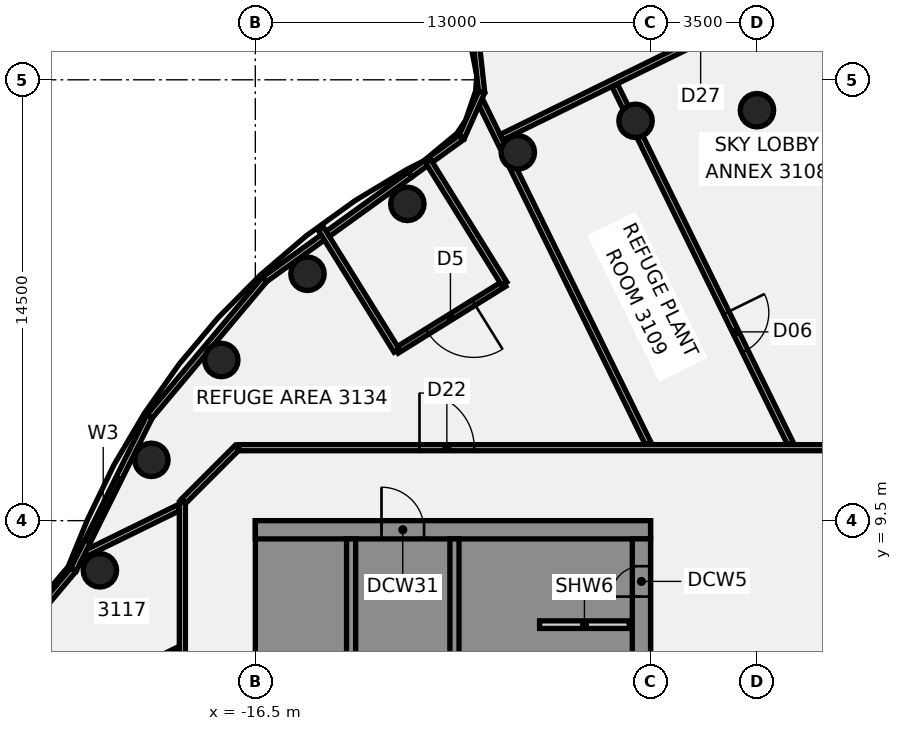
"""IFC4 building model, lengths in metres.
Left out: names, types, materials, properties, quantities, classifications, styles, units other than length and angle.
Written with IfcOpenShell. Run it as: python <this file> out.ifc"""

import sys

from ifc_helpers import new_model, si_unit, direction, frame, frame_2d, origin, origin_2d, place, context, subcontext, project, spatial, polyline, rectangle, circle, outline, extrude, element, fill, save


model = new_model("IFC4")
c1 = context("Model", 3, precision=1e-05, world=origin(), true_north=direction((0.0, 1.0)))
c2 = subcontext(c1, "Body", "Model", "MODEL_VIEW")
j1 = project(units=[si_unit("LENGTHUNIT", "METRE"), si_unit("PLANEANGLEUNIT", "RADIAN")], contexts=[c1])
p1 = place(None, origin())
s1 = spatial("IfcSite", under=j1, at=p1, CompositionType="ELEMENT")
p2 = place(p1, origin())
s2 = spatial("IfcBuilding", under=s1, at=p2, CompositionType="ELEMENT")
p3 = place(p2, frame((0.0, 0.0, 128.5)))
s3 = spatial("IfcBuildingStorey", under=s2, at=p3, CompositionType="ELEMENT", Elevation=128.5)
for number, where, z_axis, x_axis in (
    (1, (0.0, 23.0, -0.18), (0.0, 0.0, 1.0), (1.0, 0.0, 0.0)),
    (2, (-3.994, 22.651, -0.18), (0.0, 0.0, 1.0), (1.0, 0.0, 0.0)),
    (3, (-7.866, 21.613, -0.18), (0.0, 0.0, 1.0), (1.0, 0.0, 0.0)),
    (4, (-11.5, 19.919, -0.18), (0.0, 0.0, 1.0), (1.0, 0.0, 0.0)),
    (5, (-14.784, 17.619, -0.18), (0.0, 0.0, 1.0), (1.0, 0.0, 0.0)),
    (6, (-17.619, 14.784, -0.18), (0.0, 0.0, 1.0), (1.0, 0.0, 0.0)),
    (7, (-19.919, 11.5, -0.18), (0.0, 0.0, 1.0), (1.0, 0.0, 0.0)),
    (8, (-21.613, 7.866, -0.18), (0.0, 0.0, 1.0), (1.0, 0.0, 0.0)),
):
    element("IfcColumn", number, at=place(p3, frame(where, z_axis=z_axis, x_axis=x_axis)), inside=s3, PredefinedType="COLUMN", context=c2, shape_type="SweptSolid", body=[
        extrude(circle(Radius=0.55, at=origin_2d()), origin(), (0.0, 0.0, 1.0), 4.54),
    ])
p4 = place(p3, frame((-9.071, 23.236, 0.0), z_axis=(0.0, 0.0, 1.0), x_axis=(0.440237576132, -0.897881326547, 0.0)))
e9 = element("IfcWall", 9, at=p4, inside=s3, PredefinedType="PARTITIONING", context=c2, shape_type="SweptSolid", body=[
    extrude(rectangle(XDim=1.585, YDim=0.2, at=frame_2d((0.792, 0.0))), origin(), (0.0, 0.0, 1.0), 3.66),
])
p5 = place(p3, frame((-8.02, 21.094, 0.0), z_axis=(0.0, 0.0, 1.0), x_axis=(0.440277206209, -0.897861894555, 0.0)))
e10 = element("IfcWall", 10, at=p5, inside=s3, PredefinedType="PARTITIONING", context=c2, shape_type="SweptSolid", body=[
    extrude(rectangle(XDim=10.1, YDim=0.2, at=frame_2d((5.05, 0.0))), origin(), (0.0, 0.0, 1.0), 3.66),
])
p6 = place(p3, frame((-4.682, 23.825, 0.0), z_axis=(0.0, 0.0, 1.0), x_axis=(0.440176037117, -0.897911496946, 0.0)))
e11 = element("IfcWall", 11, at=p6, inside=s3, PredefinedType="PARTITIONING", context=c2, shape_type="SweptSolid", body=[
    extrude(rectangle(XDim=0.82, YDim=0.2, at=frame_2d((0.41, 0.0))), origin(), (0.0, 0.0, 1.0), 3.66),
])
p7 = place(p3, frame((-3.85, 22.129, 0.0), z_axis=(0.0, 0.0, 1.0), x_axis=(0.440292349425, -0.897854468741, 0.0)))
e12 = element("IfcWall", 12, at=p7, inside=s3, PredefinedType="PARTITIONING", context=c2, shape_type="SweptSolid", body=[
    extrude(rectangle(XDim=11.253, YDim=0.2, at=frame_2d((5.626, 0.0))), origin(), (0.0, 0.0, 1.0), 3.66),
])
p8 = place(p7, frame((6.45, 0.0, 0.0)))
e13 = element("IfcOpeningElement", 13, at=p8, cuts=e12, PredefinedType="OPENING", context=c2, shape_type="SweptSolid", body=[
    extrude(rectangle(XDim=1.4, YDim=2.1, at=frame_2d((0.7, 1.05))), frame((0.0, 0.11, 0.0), z_axis=(0.0, -1.0, 0.0), x_axis=(1.0, 0.0, 0.0)), (0.0, 0.0, 1.0), 0.22),
])
p9 = place(p3, frame((1.424, 26.819, 0.0), z_axis=(0.0, 0.0, 1.0), x_axis=(0.44020427787, -0.897897652155, 0.0)))
e14 = element("IfcWall", 14, at=p9, inside=s3, PredefinedType="PARTITIONING", context=c2, shape_type="SweptSolid", body=[
    extrude(rectangle(XDim=4.593, YDim=0.2, at=frame_2d((2.296, 0.0))), origin(), (0.0, 0.0, 1.0), 3.66),
])
p10 = place(p3, frame((-17.045, 11.9, 0.0), z_axis=(0.0, 0.0, 1.0), x_axis=(1.0, 0.0, 0.0)))
e15 = element("IfcWall", 15, at=p10, inside=s3, PredefinedType="PARTITIONING", context=c2, shape_type="SweptSolid", body=[
    extrude(rectangle(XDim=34.145, YDim=0.2, at=frame_2d((17.073, 0.0))), origin(), (0.0, 0.0, 1.0), 3.66),
])
p11 = place(p10, frame((21.061, 0.0, 0.0)))
e16 = element("IfcOpeningElement", 16, at=p11, cuts=e15, PredefinedType="OPENING", context=c2, shape_type="SweptSolid", body=[
    extrude(rectangle(XDim=1.8, YDim=2.1, at=frame_2d((0.9, 1.05))), frame((0.0, 0.11, 0.0), z_axis=(0.0, -1.0, 0.0), x_axis=(1.0, 0.0, 0.0)), (0.0, 0.0, 1.0), 0.22),
])
p12 = place(p10, frame((30.796, 0.0, 0.0)))
e17 = element("IfcOpeningElement", 17, at=p12, cuts=e15, PredefinedType="OPENING", context=c2, shape_type="SweptSolid", body=[
    extrude(rectangle(XDim=1.8, YDim=2.1, at=frame_2d((0.9, 1.05))), frame((0.0, 0.11, 0.0), z_axis=(0.0, -1.0, 0.0), x_axis=(1.0, 0.0, 0.0)), (0.0, 0.0, 1.0), 0.22),
])
p13 = place(p10, frame((5.945, 0.0, 0.0)))
e18 = element("IfcOpeningElement", 18, at=p13, cuts=e15, PredefinedType="OPENING", context=c2, shape_type="SweptSolid", body=[
    extrude(rectangle(XDim=1.8, YDim=2.1, at=frame_2d((0.9, 1.05))), frame((0.0, 0.11, 0.0), z_axis=(0.0, -1.0, 0.0), x_axis=(1.0, 0.0, 0.0)), (0.0, 0.0, 1.0), 0.22),
])
p14 = place(p3, frame((-22.181, 3.698, 0.0), z_axis=(0.0, 0.0, 1.0), x_axis=(0.897873346888, 0.440253850578, 0.0)))
e19 = element("IfcWall", 19, at=p14, inside=s3, PredefinedType="PARTITIONING", context=c2, shape_type="SweptSolid", body=[
    extrude(rectangle(XDim=3.515, YDim=0.2, at=frame_2d((1.757, 0.0))), origin(), (0.0, 0.0, 1.0), 3.66),
])
p15 = place(p3, frame((-22.17, 8.382, 0.0), z_axis=(0.0, 0.0, 1.0), x_axis=(0.897982311867, 0.44003155293, 0.0)))
e20 = element("IfcWall", 20, at=p15, inside=s3, PredefinedType="PARTITIONING", context=c2, shape_type="SweptSolid", body=[
    extrude(rectangle(XDim=3.501, YDim=0.2, at=frame_2d((1.751, 0.0))), origin(), (0.0, 0.0, 1.0), 3.66),
])
p16 = place(p3, frame((-8.407, 22.11, 0.0), z_axis=(0.0, 0.0, 1.0), x_axis=(0.897880211861, 0.440239849569, 0.0)))
e21 = element("IfcWall", 21, at=p16, inside=s3, PredefinedType="PARTITIONING", context=c2, shape_type="SweptSolid", body=[
    extrude(rectangle(XDim=14.199, YDim=0.2, at=frame_2d((7.1, 0.0))), origin(), (0.0, 0.0, 1.0), 3.66),
])
p17 = place(p16, frame((6.601, 0.0, 0.0)))
e22 = element("IfcOpeningElement", 22, at=p17, cuts=e21, PredefinedType="OPENING", context=c2, shape_type="SweptSolid", body=[
    extrude(rectangle(XDim=1.4, YDim=2.1, at=frame_2d((0.7, 1.05))), frame((0.0, 0.11, 0.0), z_axis=(0.0, -1.0, 0.0), x_axis=(1.0, 0.0, 0.0)), (0.0, 0.0, 1.0), 0.22),
])
p18 = place(p3, frame((-18.858, 10.142, 0.0), z_axis=(0.0, 0.0, 1.0), x_axis=(0.707106781187, 0.707106781187, 0.0)))
e23 = element("IfcWall", 23, at=p18, inside=s3, PredefinedType="PARTITIONING", context=c2, shape_type="SweptSolid", body=[
    extrude(rectangle(XDim=2.486, YDim=0.2, at=frame_2d((1.243, 0.0))), origin(), (0.0, 0.0, 1.0), 3.66),
])
p19 = place(p3, frame((-18.9, -10.1, 0.0), z_axis=(0.0, 0.0, 1.0), x_axis=(0.0, 1.0, 0.0)))
e24 = element("IfcWall", 24, at=p19, inside=s3, PredefinedType="PARTITIONING", context=c2, shape_type="SweptSolid", body=[
    extrude(rectangle(XDim=20.2, YDim=0.2, at=frame_2d((10.1, 0.0))), origin(), (0.0, 0.0, 1.0), 3.66),
])
p20 = place(p19, frame((11.583, 0.0, 0.0)))
e25 = element("IfcOpeningElement", 25, at=p20, cuts=e24, PredefinedType="OPENING", context=c2, shape_type="SweptSolid", body=[
    extrude(rectangle(XDim=1.8, YDim=2.1, at=frame_2d((0.9, 1.05))), frame((0.0, 0.11, 0.0), z_axis=(0.0, -1.0, 0.0), x_axis=(1.0, 0.0, 0.0)), (0.0, 0.0, 1.0), 0.22),
])
p21 = place(p19, frame((4.356, 0.0, 0.0)))
e26 = element("IfcOpeningElement", 26, at=p21, cuts=e24, PredefinedType="OPENING", context=c2, shape_type="SweptSolid", body=[
    extrude(rectangle(XDim=1.4, YDim=2.1, at=frame_2d((0.7, 1.05))), frame((0.0, 0.11, 0.0), z_axis=(0.0, -1.0, 0.0), x_axis=(1.0, 0.0, 0.0)), (0.0, 0.0, 1.0), 0.22),
])
p22 = place(p3, frame((-9.244, 25.313, 0.0), z_axis=(0.0, 0.0, 1.0), x_axis=(0.109471500068, -0.993989934895, 0.0)))
e27 = element("IfcWall", 27, at=p22, inside=s3, PredefinedType="SOLIDWALL", context=c2, shape_type="SweptSolid", body=[
    extrude(rectangle(XDim=1.731, YDim=0.2, at=frame_2d((0.865, 0.0))), origin(), (0.0, 0.0, 1.0), 4.36),
])
p23 = place(p3, frame((-9.055, 23.593, 0.0), z_axis=(0.0, 0.0, 1.0), x_axis=(-0.407568379485, -0.913174690869, 0.0)))
e28 = element("IfcWall", 28, at=p23, inside=s3, PredefinedType="SOLIDWALL", context=c2, shape_type="SweptSolid", body=[
    extrude(rectangle(XDim=1.631, YDim=0.2, at=frame_2d((0.815, 0.0))), origin(), (0.0, 0.0, 1.0), 4.36),
])
p24 = place(p3, frame((-9.72, 22.103, 0.0), z_axis=(0.0, 0.0, 1.0), x_axis=(-0.810756201685, -0.585383960687, 0.0)))
e29 = element("IfcWall", 29, at=p24, inside=s3, PredefinedType="SOLIDWALL", context=c2, shape_type="SweptSolid", body=[
    extrude(rectangle(XDim=2.091, YDim=0.2, at=frame_2d((1.045, 0.0))), origin(), (0.0, 0.0, 1.0), 4.36),
])
p25 = place(p3, frame((-11.415, 20.879, 0.0), z_axis=(0.0, 0.0, 1.0), x_axis=(-0.811328226988, -0.584590889506, 0.0)))
e30 = element("IfcWall", 30, at=p25, inside=s3, PredefinedType="SOLIDWALL", context=c2, shape_type="SweptSolid", body=[
    extrude(rectangle(XDim=5.888, YDim=0.2, at=frame_2d((2.944, 0.0))), origin(), (0.0, 0.0, 1.0), 4.36),
])
p26 = place(p3, frame((-16.192, 17.438, 0.0), z_axis=(0.0, 0.0, 1.0), x_axis=(-0.643011155171, -0.765856810589, 0.0)))
e31 = element("IfcWall", 31, at=p26, inside=s3, PredefinedType="SOLIDWALL", context=c2, shape_type="SweptSolid", body=[
    extrude(rectangle(XDim=5.887, YDim=0.2, at=frame_2d((2.943, 0.0))), origin(), (0.0, 0.0, 1.0), 4.36),
])
p27 = place(p3, frame((-19.977, 12.929, 0.0), z_axis=(0.0, 0.0, 1.0), x_axis=(-0.444924691548, -0.895567986727, 0.0)))
e32 = element("IfcWall", 32, at=p27, inside=s3, PredefinedType="SOLIDWALL", context=c2, shape_type="SweptSolid", body=[
    extrude(rectangle(XDim=5.635, YDim=0.2, at=frame_2d((2.818, 0.0))), origin(), (0.0, 0.0, 1.0), 4.36),
])
p28 = place(p27, frame((2.23, 0.0, 1.4)))
e33 = element("IfcOpeningElement", 33, at=p28, cuts=e32, PredefinedType="OPENING", context=c2, shape_type="SweptSolid", body=[
    extrude(rectangle(XDim=2.4, YDim=2.1, at=frame_2d((1.2, 1.05))), frame((0.0, 0.11, 0.0), z_axis=(0.0, -1.0, 0.0), x_axis=(1.0, 0.0, 0.0)), (0.0, 0.0, 1.0), 0.22),
])
p29 = place(p3, frame((-22.484, 7.882, 0.0), z_axis=(0.0, 0.0, 1.0), x_axis=(-0.643982284825, -0.765040402091, 0.0)))
e34 = element("IfcWall", 34, at=p29, inside=s3, PredefinedType="SOLIDWALL", context=c2, shape_type="SweptSolid", body=[
    extrude(rectangle(XDim=1.666, YDim=0.2, at=frame_2d((0.833, 0.0))), origin(), (0.0, 0.0, 1.0), 4.36),
])
p30 = place(p3, frame((-8.311, 17.295, 0.0), z_axis=(0.0, 0.0, 1.0), x_axis=(-0.849445624751, -0.52767616072, 0.0)))
e35 = element("IfcWall", 35, at=p30, inside=s3, PredefinedType="SOLIDWALL", context=c2, shape_type="SweptSolid", body=[
    extrude(rectangle(XDim=4.17, YDim=0.2, at=frame_2d((2.085, 0.0))), origin(), (0.0, 0.0, 1.0), 4.36),
])
p31 = place(p30, frame((1.185, 0.0, 0.0)))
e36 = element("IfcOpeningElement", 36, at=p31, cuts=e35, PredefinedType="OPENING", context=c2, shape_type="SweptSolid", body=[
    extrude(rectangle(XDim=1.8, YDim=2.4, at=frame_2d((0.9, 1.2))), frame((0.0, 0.11, 0.0), z_axis=(0.0, -1.0, 0.0), x_axis=(1.0, 0.0, 0.0)), (0.0, 0.0, 1.0), 0.22),
])
p32 = place(p3, frame((-8.311, 17.295, 0.0), z_axis=(0.0, 0.0, 1.0), x_axis=(-0.527712449553, 0.84942308103, 0.0)))
e37 = element("IfcWall", 37, at=p32, inside=s3, PredefinedType="SOLIDWALL", context=c2, shape_type="SweptSolid", body=[
    extrude(rectangle(XDim=4.745, YDim=0.2, at=frame_2d((2.373, 0.0))), origin(), (0.0, 0.0, 1.0), 4.36),
])
p33 = place(p3, frame((-11.853, 15.094, 0.0), z_axis=(0.0, 0.0, 1.0), x_axis=(-0.527686600578, 0.849439139415, 0.0)))
e38 = element("IfcWall", 38, at=p33, inside=s3, PredefinedType="SOLIDWALL", context=c2, shape_type="SweptSolid", body=[
    extrude(rectangle(XDim=4.711, YDim=0.2, at=frame_2d((2.355, 0.0))), origin(), (0.0, 0.0, 1.0), 4.36),
])
p34 = place(p3, origin())
e39 = element("IfcWall", 39, at=p34, inside=s3, PredefinedType="SHEAR", context=c2, shape_type="SweptSolid", body=[
    extrude(outline(polyline([(-13.5, -8.9), (-13.5, -8.125), (-15.9, -8.125), (-15.9, -5.625), (-13.5, -5.625), (-13.5, -5.375), (-15.9, -5.375), (-15.9, -2.875), (-13.5, -2.875), (-13.5, -2.625), (-15.9, -2.625), (-15.9, -0.125), (-13.5, -0.125), (-13.5, 0.125), (-15.9, 0.125), (-15.9, 2.625), (-13.5, 2.625), (-13.5, 2.875), (-15.9, 2.875), (-15.9, 5.375), (-13.5, 5.375), (-13.5, 5.625), (-15.9, 5.625), (-15.9, 8.125), (-13.5, 8.125), (-13.5, 8.9), (-15.9, 8.9), (-16.5, 8.9), (-16.5, -8.9), (-15.9, -8.9), (-13.5, -8.9)])), origin(), (0.0, 0.0, 1.0), 4.36),
])
p35 = place(p3, frame((-16.5, 9.2, 0.0), z_axis=(0.0, 0.0, 1.0), x_axis=(1.0, 0.0, 0.0)))
e40 = element("IfcWall", 40, at=p35, inside=s3, PredefinedType="SHEAR", context=c2, shape_type="SweptSolid", body=[
    extrude(rectangle(XDim=13.0, YDim=0.6, at=frame_2d((6.5, 0.0))), origin(), (0.0, 0.0, 1.0), 4.36),
])
p36 = place(p35, frame((4.15, 0.0, 0.0)))
e41 = element("IfcOpeningElement", 41, at=p36, cuts=e40, PredefinedType="OPENING", context=c2, shape_type="SweptSolid", body=[
    extrude(rectangle(XDim=1.4, YDim=2.1, at=frame_2d((0.7, 1.05))), frame((0.0, 0.31, 0.0), z_axis=(0.0, -1.0, 0.0), x_axis=(1.0, 0.0, 0.0)), (0.0, 0.0, 1.0), 0.62),
])
p37 = place(p3, origin())
e42 = element("IfcWall", 42, at=p37, inside=s3, PredefinedType="SHEAR", context=c2, shape_type="SweptSolid", body=[
    extrude(outline(polyline([(-9.8, -5.375), (-9.8, -5.625), (-7.5, -5.625), (-7.2, -5.625), (-7.2, 8.9), (-7.5, 8.9), (-9.8, 8.9), (-9.8, 8.125), (-7.5, 8.125), (-7.5, 5.625), (-9.8, 5.625), (-9.8, 5.375), (-7.5, 5.375), (-7.5, 2.875), (-9.8, 2.875), (-9.8, 2.625), (-7.5, 2.625), (-7.5, 0.125), (-9.8, 0.125), (-9.8, -0.125), (-7.5, -0.125), (-7.5, -2.625), (-9.8, -2.625), (-9.8, -2.875), (-7.5, -2.875), (-7.5, -5.375), (-9.8, -5.375)])), origin(), (0.0, 0.0, 1.0), 4.36),
])
p38 = place(p3, frame((-13.35, -8.9, 0.0), z_axis=(0.0, 0.0, 1.0), x_axis=(0.0, 1.0, 0.0)))
e43 = element("IfcWall", 43, at=p38, inside=s3, PredefinedType="SHEAR", context=c2, shape_type="SweptSolid", body=[
    extrude(rectangle(XDim=17.8, YDim=0.3, at=frame_2d((8.9, 0.0))), origin(), (0.0, 0.0, 1.0), 4.36),
])
p39 = place(p38, frame((1.325, 0.0, 0.0)))
e44 = element("IfcOpeningElement", 44, at=p39, cuts=e43, PredefinedType="OPENING", context=c2, shape_type="SweptSolid", body=[
    extrude(rectangle(XDim=1.4, YDim=2.1, at=frame_2d((0.7, 1.05))), frame((0.0, 0.16, 0.0), z_axis=(0.0, -1.0, 0.0), x_axis=(1.0, 0.0, 0.0)), (0.0, 0.0, 1.0), 0.32),
])
p40 = place(p38, frame((4.225, 0.0, 0.0)))
e45 = element("IfcOpeningElement", 45, at=p40, cuts=e43, PredefinedType="OPENING", context=c2, shape_type="SweptSolid", body=[
    extrude(rectangle(XDim=1.1, YDim=2.1, at=frame_2d((0.55, 1.05))), frame((0.0, 0.16, 0.0), z_axis=(0.0, -1.0, 0.0), x_axis=(1.0, 0.0, 0.0)), (0.0, 0.0, 1.0), 0.32),
])
p41 = place(p38, frame((6.975, 0.0, 0.0)))
e46 = element("IfcOpeningElement", 46, at=p41, cuts=e43, PredefinedType="OPENING", context=c2, shape_type="SweptSolid", body=[
    extrude(rectangle(XDim=1.1, YDim=2.1, at=frame_2d((0.55, 1.05))), frame((0.0, 0.16, 0.0), z_axis=(0.0, -1.0, 0.0), x_axis=(1.0, 0.0, 0.0)), (0.0, 0.0, 1.0), 0.32),
])
p42 = place(p38, frame((9.725, 0.0, 0.0)))
e47 = element("IfcOpeningElement", 47, at=p42, cuts=e43, PredefinedType="OPENING", context=c2, shape_type="SweptSolid", body=[
    extrude(rectangle(XDim=1.1, YDim=2.1, at=frame_2d((0.55, 1.05))), frame((0.0, 0.16, 0.0), z_axis=(0.0, -1.0, 0.0), x_axis=(1.0, 0.0, 0.0)), (0.0, 0.0, 1.0), 0.32),
])
p43 = place(p38, frame((12.475, 0.0, 0.0)))
e48 = element("IfcOpeningElement", 48, at=p43, cuts=e43, PredefinedType="OPENING", context=c2, shape_type="SweptSolid", body=[
    extrude(rectangle(XDim=1.1, YDim=2.1, at=frame_2d((0.55, 1.05))), frame((0.0, 0.16, 0.0), z_axis=(0.0, -1.0, 0.0), x_axis=(1.0, 0.0, 0.0)), (0.0, 0.0, 1.0), 0.32),
])
p44 = place(p3, frame((-9.95, -8.9, 0.0), z_axis=(0.0, 0.0, 1.0), x_axis=(0.0, 1.0, 0.0)))
e49 = element("IfcWall", 49, at=p44, inside=s3, PredefinedType="SHEAR", context=c2, shape_type="SweptSolid", body=[
    extrude(rectangle(XDim=17.8, YDim=0.3, at=frame_2d((8.9, 0.0))), origin(), (0.0, 0.0, 1.0), 4.36),
])
p45 = place(p44, frame((4.175, 0.0, 0.0)))
e50 = element("IfcOpeningElement", 50, at=p45, cuts=e49, PredefinedType="OPENING", context=c2, shape_type="SweptSolid", body=[
    extrude(rectangle(XDim=1.2, YDim=2.1, at=frame_2d((0.6, 1.05))), frame((0.0, 0.16, 0.0), z_axis=(0.0, -1.0, 0.0), x_axis=(1.0, 0.0, 0.0)), (0.0, 0.0, 1.0), 0.32),
])
p46 = place(p44, frame((6.925, 0.0, 0.0)))
e51 = element("IfcOpeningElement", 51, at=p46, cuts=e49, PredefinedType="OPENING", context=c2, shape_type="SweptSolid", body=[
    extrude(rectangle(XDim=1.2, YDim=2.1, at=frame_2d((0.6, 1.05))), frame((0.0, 0.16, 0.0), z_axis=(0.0, -1.0, 0.0), x_axis=(1.0, 0.0, 0.0)), (0.0, 0.0, 1.0), 0.32),
])
p47 = place(p3, frame((-3.8, -8.9, 0.0), z_axis=(0.0, 0.0, 1.0), x_axis=(0.0, 1.0, 0.0)))
e52 = element("IfcWall", 52, at=p47, inside=s3, PredefinedType="SHEAR", context=c2, shape_type="SweptSolid", body=[
    extrude(rectangle(XDim=17.8, YDim=0.6, at=frame_2d((8.9, 0.0))), origin(), (0.0, 0.0, 1.0), 4.36),
])
p48 = place(p47, frame((1.25, 0.0, 0.0)))
e53 = element("IfcOpeningElement", 53, at=p48, cuts=e52, PredefinedType="OPENING", context=c2, shape_type="SweptSolid", body=[
    extrude(rectangle(XDim=1.8, YDim=2.1, at=frame_2d((0.9, 1.05))), frame((0.0, 0.31, 0.0), z_axis=(0.0, -1.0, 0.0), x_axis=(1.0, 0.0, 0.0)), (0.0, 0.0, 1.0), 0.62),
])
p49 = place(p47, frame((12.377, 0.0, 0.0)))
e54 = element("IfcOpeningElement", 54, at=p49, cuts=e52, PredefinedType="OPENING", context=c2, shape_type="SweptSolid", body=[
    extrude(rectangle(XDim=1.0, YDim=2.1, at=frame_2d((0.5, 1.05))), frame((0.0, 0.31, 0.0), z_axis=(0.0, -1.0, 0.0), x_axis=(1.0, 0.0, 0.0)), (0.0, 0.0, 1.0), 0.62),
])
p50 = place(p47, frame((15.903, 0.0, 0.0)))
e55 = element("IfcOpeningElement", 55, at=p50, cuts=e52, PredefinedType="OPENING", context=c2, shape_type="SweptSolid", body=[
    extrude(rectangle(XDim=1.0, YDim=2.1, at=frame_2d((0.5, 1.05))), frame((0.0, 0.31, 0.0), z_axis=(0.0, -1.0, 0.0), x_axis=(1.0, 0.0, 0.0)), (0.0, 0.0, 1.0), 0.62),
])
p51 = place(p3, frame((-7.15, 6.08, 0.0), z_axis=(0.0, 0.0, 1.0), x_axis=(1.0, 0.0, 0.0)))
e56 = element("IfcWall", 56, at=p51, inside=s3, PredefinedType="PARTITIONING", context=c2, shape_type="SweptSolid", body=[
    extrude(rectangle(XDim=2.95, YDim=0.25, at=frame_2d((1.475, 0.0))), origin(), (0.0, 0.0, 1.0), 4.36),
])
p52 = place(p8, frame((1.4, 0.0, 0.0), z_axis=(0.0, 0.0, 1.0), x_axis=(-1.0, 0.0, 0.0)))
e57 = element("IfcDoor", 57, at=p52, inside=s3, OperationType="DOUBLE_DOOR_SINGLE_SWING", PredefinedType="DOOR", context=c2, shape_type="SweptSolid", body=[
    extrude(rectangle(XDim=1.4, YDim=2.1, at=frame_2d((0.7, 1.05))), frame((0.0, 0.025, 0.0), z_axis=(0.0, -1.0, 0.0), x_axis=(1.0, 0.0, 0.0)), (0.0, 0.0, 1.0), 0.05),
])
fill(e13, e57)
p53 = place(p13, origin())
e58 = element("IfcDoor", 58, at=p53, inside=s3, OperationType="DOUBLE_DOOR_SINGLE_SWING", PredefinedType="DOOR", context=c2, shape_type="SweptSolid", body=[
    extrude(rectangle(XDim=1.8, YDim=2.1, at=frame_2d((0.9, 1.05))), frame((0.0, 0.025, 0.0), z_axis=(0.0, -1.0, 0.0), x_axis=(1.0, 0.0, 0.0)), (0.0, 0.0, 1.0), 0.05),
])
fill(e18, e58)
p54 = place(p28, origin())
e59 = element("IfcWindow", 59, at=p54, inside=s3, PartitioningType="SINGLE_PANEL", PredefinedType="WINDOW", context=c2, shape_type="SweptSolid", body=[
    extrude(rectangle(XDim=2.4, YDim=2.1, at=frame_2d((1.2, 1.05))), frame((0.0, 0.03, 0.0), z_axis=(0.0, -1.0, 0.0), x_axis=(1.0, 0.0, 0.0)), (0.0, 0.0, 1.0), 0.06),
])
fill(e33, e59)
p55 = place(p31, origin())
e60 = element("IfcDoor", 60, at=p55, inside=s3, OperationType="SINGLE_SWING_LEFT", PredefinedType="DOOR", context=c2, shape_type="SweptSolid", body=[
    extrude(rectangle(XDim=1.8, YDim=2.4, at=frame_2d((0.9, 1.2))), frame((0.0, 0.025, 0.0), z_axis=(0.0, -1.0, 0.0), x_axis=(1.0, 0.0, 0.0)), (0.0, 0.0, 1.0), 0.05),
])
fill(e36, e60)
p56 = place(p50, origin())
e61 = element("IfcDoor", 61, at=p56, inside=s3, OperationType="SINGLE_SWING_LEFT", PredefinedType="DOOR", context=c2, shape_type="SweptSolid", body=[
    extrude(rectangle(XDim=1.0, YDim=2.1, at=frame_2d((0.5, 1.05))), frame((0.0, 0.275, 0.0), z_axis=(0.0, -1.0, 0.0), x_axis=(1.0, 0.0, 0.0)), (0.0, 0.0, 1.0), 0.05),
])
fill(e55, e61)
p57 = place(p36, origin())
e62 = element("IfcDoor", 62, at=p57, inside=s3, OperationType="SINGLE_SWING_LEFT", PredefinedType="DOOR", context=c2, shape_type="SweptSolid", body=[
    extrude(rectangle(XDim=1.4, YDim=2.1, at=frame_2d((0.7, 1.05))), frame((0.0, 0.025, 0.0), z_axis=(0.0, -1.0, 0.0), x_axis=(1.0, 0.0, 0.0)), (0.0, 0.0, 1.0), 0.05),
])
fill(e41, e62)
save(model, sys.argv[1])
